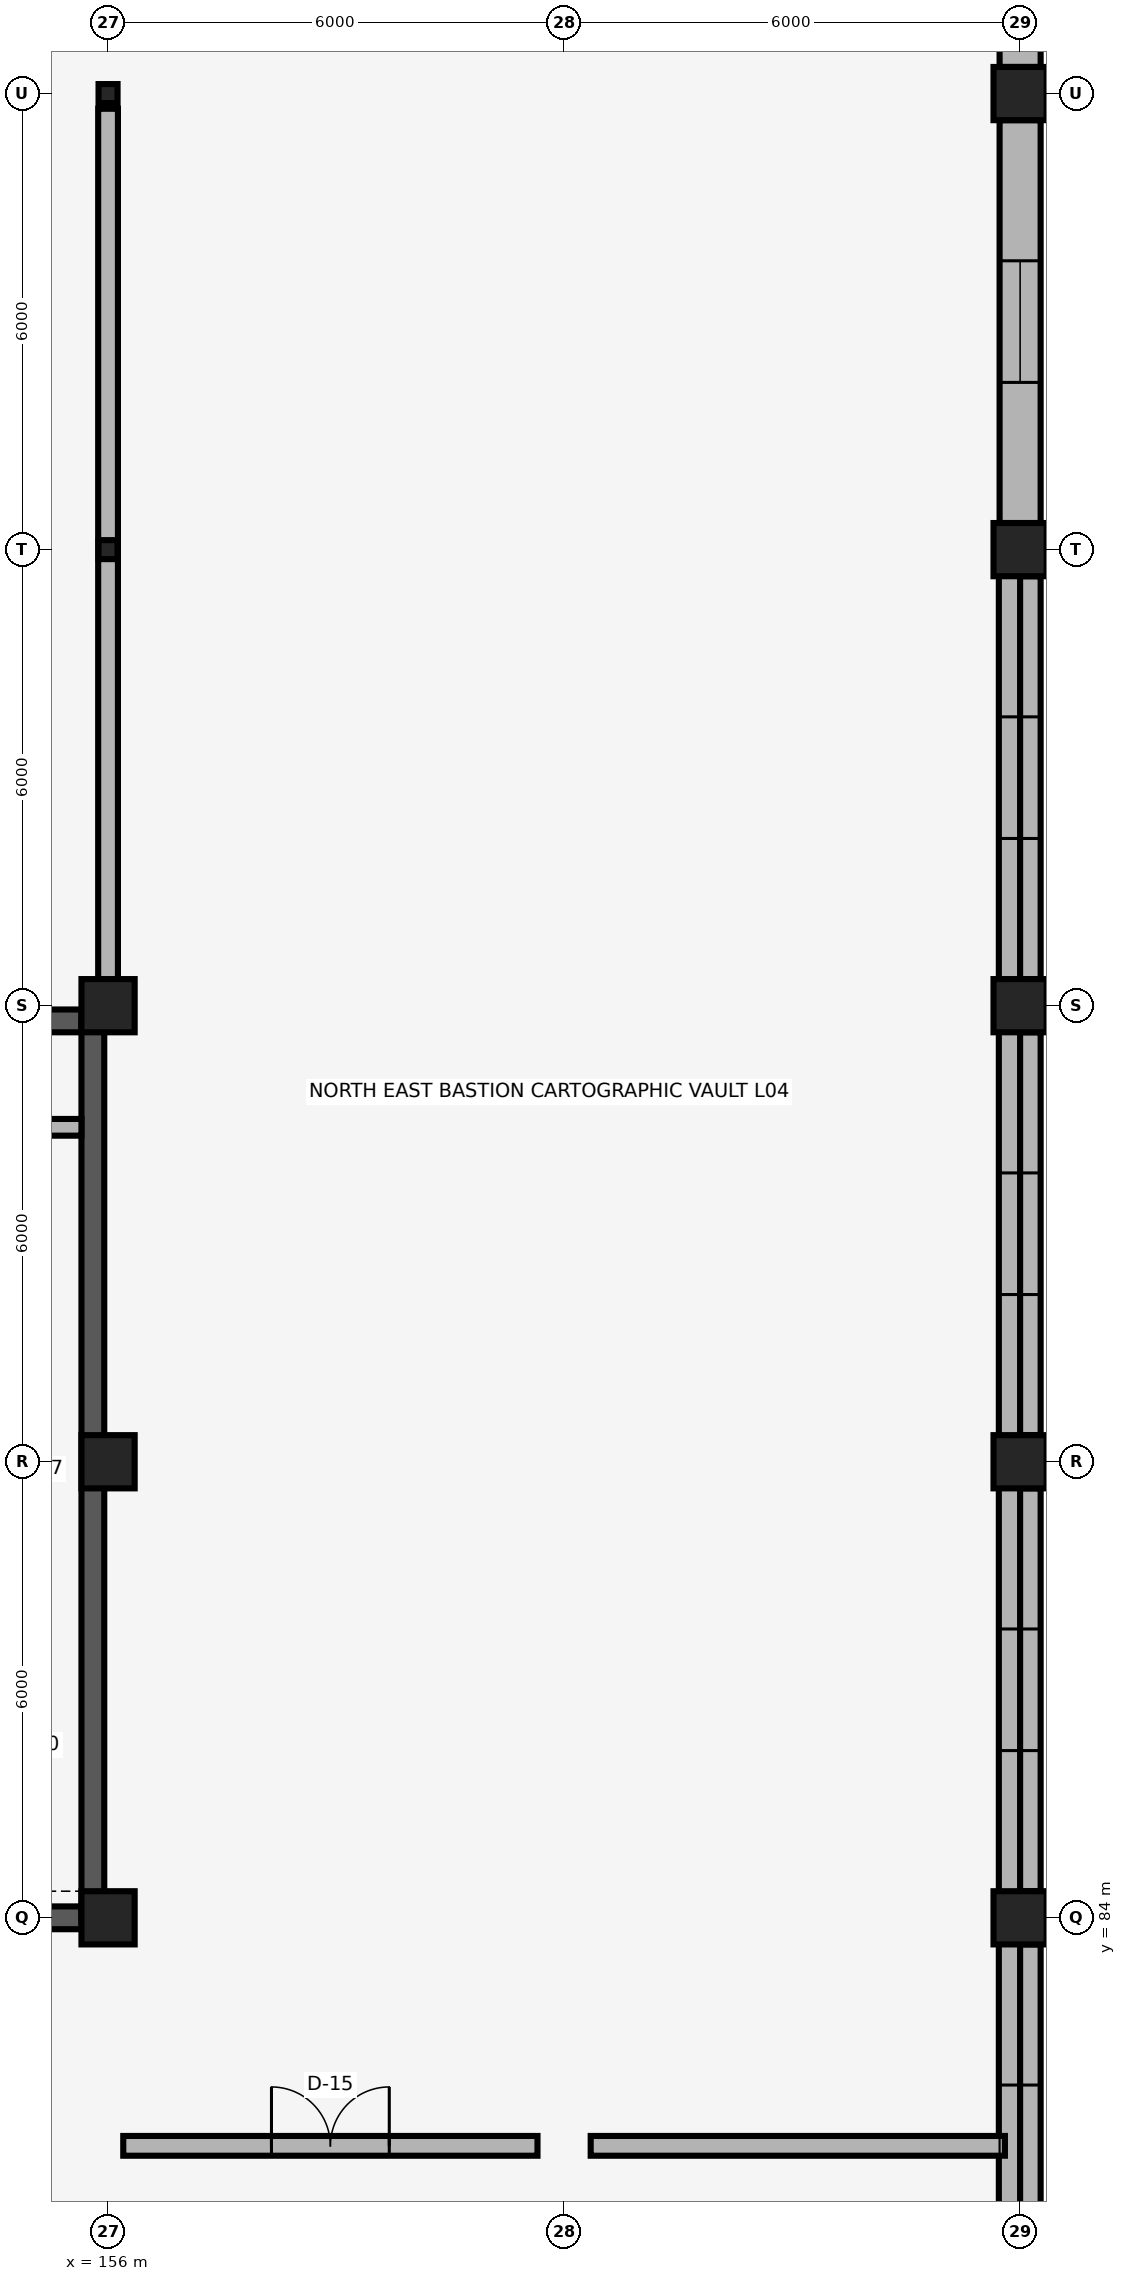
"""IFC4 building model, lengths in metres.
Left out: names, types, materials, properties, quantities, classifications, styles, units other than length and angle.
Written with IfcOpenShell. Run it as: python <this file> out.ifc"""

import sys

from ifc_helpers import new_model, si_unit, direction, frame, frame_2d, origin, origin_2d, place, context, subcontext, project, spatial, rectangle, i_section, extrude, element, fill, save


model = new_model("IFC4")
c1 = context("Model", 3, precision=1e-05, world=origin(), true_north=direction((0.0, 1.0)))
c2 = subcontext(c1, "Body", "Model", "MODEL_VIEW")
j1 = project(units=[si_unit("LENGTHUNIT", "METRE"), si_unit("PLANEANGLEUNIT", "RADIAN")], contexts=[c1])
p1 = place(None, origin())
s1 = spatial("IfcSite", under=j1, at=p1, CompositionType="ELEMENT")
p2 = place(p1, origin())
s2 = spatial("IfcBuilding", under=s1, at=p2, CompositionType="ELEMENT")
p3 = place(p2, frame((0.0, 0.0, 16.5)))
s3 = spatial("IfcBuildingStorey", under=s2, at=p3, CompositionType="ELEMENT", Elevation=16.5)
for number, where, z_axis, x_axis in (
    (1, (156.0, 84.0, 0.0), (0.0, 0.0, 1.0), (1.0, 0.0, 0.0)),
    (2, (168.0, 84.0, 0.0), (0.0, 0.0, 1.0), (1.0, 0.0, 0.0)),
    (3, (156.0, 90.0, 0.0), (0.0, 0.0, 1.0), (1.0, 0.0, 0.0)),
    (4, (168.0, 90.0, 0.0), (0.0, 0.0, 1.0), (1.0, 0.0, 0.0)),
    (5, (156.0, 96.0, 0.0), (0.0, 0.0, 1.0), (1.0, 0.0, 0.0)),
    (6, (168.0, 96.0, 0.0), (0.0, 0.0, 1.0), (1.0, 0.0, 0.0)),
):
    element("IfcColumn", number, at=place(p3, frame(where, z_axis=z_axis, x_axis=x_axis)), inside=s3, PredefinedType="COLUMN", context=c2, shape_type="SweptSolid", body=[
        extrude(rectangle(XDim=0.7, YDim=0.7, at=origin_2d()), origin(), (0.0, 0.0, 1.0), 4.0),
    ])
p4 = place(p3, frame((156.0, 102.0, 0.0), z_axis=(0.0, 0.0, 1.0), x_axis=(1.0, 0.0, 0.0)))
e7 = element("IfcColumn", 7, at=p4, inside=s3, PredefinedType="COLUMN", context=c2, shape_type="SweptSolid", body=[
    extrude(i_section(OverallWidth=0.25, OverallDepth=0.25, WebThickness=0.009, FlangeThickness=0.014, FilletRadius=0.016, at=origin_2d()), origin(), (0.0, 0.0, 1.0), 4.0),
])
p5 = place(p3, frame((168.0, 102.0, 0.0), z_axis=(0.0, 0.0, 1.0), x_axis=(1.0, 0.0, 0.0)))
e8 = element("IfcColumn", 8, at=p5, inside=s3, PredefinedType="COLUMN", context=c2, shape_type="SweptSolid", body=[
    extrude(rectangle(XDim=0.7, YDim=0.7, at=origin_2d()), origin(), (0.0, 0.0, 1.0), 4.0),
])
p6 = place(p3, frame((156.0, 108.0, 0.0), z_axis=(0.0, 0.0, 1.0), x_axis=(1.0, 0.0, 0.0)))
e9 = element("IfcColumn", 9, at=p6, inside=s3, PredefinedType="COLUMN", context=c2, shape_type="SweptSolid", body=[
    extrude(i_section(OverallWidth=0.25, OverallDepth=0.25, WebThickness=0.009, FlangeThickness=0.014, FilletRadius=0.016, at=origin_2d()), origin(), (0.0, 0.0, 1.0), 4.0),
])
p7 = place(p3, frame((168.0, 108.0, 0.0), z_axis=(0.0, 0.0, 1.0), x_axis=(1.0, 0.0, 0.0)))
e10 = element("IfcColumn", 10, at=p7, inside=s3, PredefinedType="COLUMN", context=c2, shape_type="SweptSolid", body=[
    extrude(rectangle(XDim=0.7, YDim=0.7, at=origin_2d()), origin(), (0.0, 0.0, 1.0), 4.0),
])
p8 = place(p3, frame((168.0, 78.35, 0.0), z_axis=(0.0, 0.0, 1.0), x_axis=(0.0, 1.0, 0.0)))
e11 = element("IfcWall", 11, at=p8, inside=s3, PredefinedType="SOLIDWALL", context=c2, shape_type="SweptSolid", body=[
    extrude(rectangle(XDim=5.3, YDim=0.54, at=frame_2d((2.65, 0.0))), origin(), (0.0, 0.0, 1.0), 3.55),
])
p9 = place(p8, frame((1.85, 0.0, 0.85)))
e12 = element("IfcOpeningElement", 12, at=p9, cuts=e11, PredefinedType="OPENING", context=c2, shape_type="SweptSolid", body=[
    extrude(rectangle(XDim=1.6, YDim=2.2, at=frame_2d((0.8, 1.1))), frame((0.0, 0.285, 0.0), z_axis=(0.0, -1.0, 0.0), x_axis=(1.0, 0.0, 0.0)), (0.0, 0.0, 1.0), 0.57),
])
p10 = place(p3, frame((168.0, 84.35, 0.0), z_axis=(0.0, 0.0, 1.0), x_axis=(0.0, 1.0, 0.0)))
e13 = element("IfcWall", 13, at=p10, inside=s3, PredefinedType="SOLIDWALL", context=c2, shape_type="SweptSolid", body=[
    extrude(rectangle(XDim=5.3, YDim=0.54, at=frame_2d((2.65, 0.0))), origin(), (0.0, 0.0, 1.0), 3.55),
])
p11 = place(p10, frame((1.85, 0.0, 0.85)))
e14 = element("IfcOpeningElement", 14, at=p11, cuts=e13, PredefinedType="OPENING", context=c2, shape_type="SweptSolid", body=[
    extrude(rectangle(XDim=1.6, YDim=2.2, at=frame_2d((0.8, 1.1))), frame((0.0, 0.285, 0.0), z_axis=(0.0, -1.0, 0.0), x_axis=(1.0, 0.0, 0.0)), (0.0, 0.0, 1.0), 0.57),
])
p12 = place(p3, frame((168.0, 90.35, 0.0), z_axis=(0.0, 0.0, 1.0), x_axis=(0.0, 1.0, 0.0)))
e15 = element("IfcWall", 15, at=p12, inside=s3, PredefinedType="SOLIDWALL", context=c2, shape_type="SweptSolid", body=[
    extrude(rectangle(XDim=5.3, YDim=0.54, at=frame_2d((2.65, 0.0))), origin(), (0.0, 0.0, 1.0), 3.55),
])
p13 = place(p12, frame((1.85, 0.0, 0.85)))
e16 = element("IfcOpeningElement", 16, at=p13, cuts=e15, PredefinedType="OPENING", context=c2, shape_type="SweptSolid", body=[
    extrude(rectangle(XDim=1.6, YDim=2.2, at=frame_2d((0.8, 1.1))), frame((0.0, 0.285, 0.0), z_axis=(0.0, -1.0, 0.0), x_axis=(1.0, 0.0, 0.0)), (0.0, 0.0, 1.0), 0.57),
])
p14 = place(p3, frame((168.0, 96.35, 0.0), z_axis=(0.0, 0.0, 1.0), x_axis=(0.0, 1.0, 0.0)))
e17 = element("IfcWall", 17, at=p14, inside=s3, PredefinedType="SOLIDWALL", context=c2, shape_type="SweptSolid", body=[
    extrude(rectangle(XDim=5.3, YDim=0.54, at=frame_2d((2.65, 0.0))), origin(), (0.0, 0.0, 1.0), 3.55),
])
p15 = place(p14, frame((1.85, 0.0, 0.85)))
e18 = element("IfcOpeningElement", 18, at=p15, cuts=e17, PredefinedType="OPENING", context=c2, shape_type="SweptSolid", body=[
    extrude(rectangle(XDim=1.6, YDim=2.2, at=frame_2d((0.8, 1.1))), frame((0.0, 0.285, 0.0), z_axis=(0.0, -1.0, 0.0), x_axis=(1.0, 0.0, 0.0)), (0.0, 0.0, 1.0), 0.57),
])
p16 = place(p3, frame((168.0, 102.35, 0.0), z_axis=(0.0, 0.0, 1.0), x_axis=(0.0, 1.0, 0.0)))
e19 = element("IfcWall", 19, at=p16, inside=s3, PredefinedType="SOLIDWALL", context=c2, shape_type="SweptSolid", body=[
    extrude(rectangle(XDim=5.3, YDim=0.54, at=frame_2d((2.65, 0.0))), origin(), (0.0, 0.0, 1.0), 3.55),
])
p17 = place(p16, frame((1.85, 0.0, 0.85)))
e20 = element("IfcOpeningElement", 20, at=p17, cuts=e19, PredefinedType="OPENING", context=c2, shape_type="SweptSolid", body=[
    extrude(rectangle(XDim=1.6, YDim=2.2, at=frame_2d((0.8, 1.1))), frame((0.0, 0.285, 0.0), z_axis=(0.0, -1.0, 0.0), x_axis=(1.0, 0.0, 0.0)), (0.0, 0.0, 1.0), 0.57),
])
p18 = place(p3, frame((168.0, 108.35, 0.0), z_axis=(0.0, 0.0, 1.0), x_axis=(0.0, 1.0, 0.0)))
e21 = element("IfcWall", 21, at=p18, inside=s3, PredefinedType="SOLIDWALL", context=c2, shape_type="SweptSolid", body=[
    extrude(rectangle(XDim=5.3, YDim=0.54, at=frame_2d((2.65, 0.0))), origin(), (0.0, 0.0, 1.0), 3.55),
])
p19 = place(p18, frame((1.925, 0.0, 0.85)))
e22 = element("IfcOpeningElement", 22, at=p19, cuts=e21, PredefinedType="OPENING", context=c2, shape_type="SweptSolid", body=[
    extrude(rectangle(XDim=1.45, YDim=2.15, at=frame_2d((0.725, 1.075))), frame((0.0, 0.285, 0.0), z_axis=(0.0, -1.0, 0.0), x_axis=(1.0, 0.0, 0.0)), (0.0, 0.0, 1.0), 0.57),
])
p20 = place(p3, frame((167.86, 12.0, 4.2), z_axis=(0.0, 0.0, 1.0), x_axis=(0.0, 1.0, 0.0)))
e23 = element("IfcWall", 23, at=p20, inside=s3, PredefinedType="PARAPET", context=c2, shape_type="SweptSolid", body=[
    extrude(rectangle(XDim=90.0, YDim=0.28, at=frame_2d((45.0, 0.0))), origin(), (0.0, 0.0, 1.0), 0.85),
])
p21 = place(p3, frame((150.35, 84.0, 0.0), z_axis=(0.0, 0.0, 1.0), x_axis=(1.0, 0.0, 0.0)))
e24 = element("IfcWall", 24, at=p21, inside=s3, PredefinedType="SHEAR", context=c2, shape_type="SweptSolid", body=[
    extrude(rectangle(XDim=5.3, YDim=0.3, at=frame_2d((2.65, 0.0))), origin(), (0.0, 0.0, 1.0), 4.0),
])
p22 = place(p21, frame((1.925, 0.0, 0.0)))
e25 = element("IfcOpeningElement", 25, at=p22, cuts=e24, PredefinedType="OPENING", context=c2, shape_type="SweptSolid", body=[
    extrude(rectangle(XDim=1.45, YDim=2.25, at=frame_2d((0.725, 1.125))), frame((0.0, 0.165, 0.0), z_axis=(0.0, -1.0, 0.0), x_axis=(1.0, 0.0, 0.0)), (0.0, 0.0, 1.0), 0.33),
])
p23 = place(p3, frame((150.35, 95.8, 0.0), z_axis=(0.0, 0.0, 1.0), x_axis=(1.0, 0.0, 0.0)))
e26 = element("IfcWall", 26, at=p23, inside=s3, PredefinedType="SHEAR", context=c2, shape_type="SweptSolid", body=[
    extrude(rectangle(XDim=5.3, YDim=0.3, at=frame_2d((2.65, 0.0))), origin(), (0.0, 0.0, 1.0), 4.0),
])
p24 = place(p3, frame((155.8, 84.0, 0.0), z_axis=(0.0, 0.0, 1.0), x_axis=(0.0, 1.0, 0.0)))
e27 = element("IfcWall", 27, at=p24, inside=s3, PredefinedType="SHEAR", context=c2, shape_type="SweptSolid", body=[
    extrude(rectangle(XDim=11.8, YDim=0.3, at=frame_2d((5.9, 0.0))), origin(), (0.0, 0.0, 1.0), 4.0),
])
p25 = place(p3, frame((154.55, 94.4, 0.0), z_axis=(0.0, 0.0, 1.0), x_axis=(1.0, 0.0, 0.0)))
e28 = element("IfcWall", 28, at=p25, inside=s3, PredefinedType="PARTITIONING", context=c2, shape_type="SweptSolid", body=[
    extrude(rectangle(XDim=1.1, YDim=0.22, at=frame_2d((0.55, 0.0))), origin(), (0.0, 0.0, 1.0), 4.0),
])
p26 = place(p3, frame((156.2, 81.0, 0.0), z_axis=(0.0, 0.0, 1.0), x_axis=(1.0, 0.0, 0.0)))
e29 = element("IfcWall", 29, at=p26, inside=s3, PredefinedType="PARTITIONING", context=c2, shape_type="SweptSolid", body=[
    extrude(rectangle(XDim=5.45, YDim=0.26, at=frame_2d((2.725, 0.0))), origin(), (0.0, 0.0, 1.0), 4.0),
])
p27 = place(p26, frame((1.95, 0.0, 0.0)))
e30 = element("IfcOpeningElement", 30, at=p27, cuts=e29, PredefinedType="OPENING", context=c2, shape_type="SweptSolid", body=[
    extrude(rectangle(XDim=1.55, YDim=2.3, at=frame_2d((0.775, 1.15))), frame((0.0, 0.145, 0.0), z_axis=(0.0, -1.0, 0.0), x_axis=(1.0, 0.0, 0.0)), (0.0, 0.0, 1.0), 0.29),
])
p28 = place(p3, frame((162.35, 81.0, 0.0), z_axis=(0.0, 0.0, 1.0), x_axis=(1.0, 0.0, 0.0)))
e31 = element("IfcWall", 31, at=p28, inside=s3, PredefinedType="PARTITIONING", context=c2, shape_type="SweptSolid", body=[
    extrude(rectangle(XDim=5.45, YDim=0.26, at=frame_2d((2.725, 0.0))), origin(), (0.0, 0.0, 1.0), 4.0),
])
p29 = place(p3, frame((156.0, 96.2, 0.0), z_axis=(0.0, 0.0, 1.0), x_axis=(0.0, 1.0, 0.0)))
e32 = element("IfcWall", 32, at=p29, inside=s3, PredefinedType="PARTITIONING", context=c2, shape_type="SweptSolid", body=[
    extrude(rectangle(XDim=11.6, YDim=0.26, at=frame_2d((5.8, 0.0))), origin(), (0.0, 0.0, 1.0), 3.56),
])
p30 = place(p9, origin())
e33 = element("IfcWindow", 33, at=p30, inside=s3, PartitioningType="SINGLE_PANEL", PredefinedType="WINDOW", context=c2, shape_type="SweptSolid", body=[
    extrude(rectangle(XDim=1.6, YDim=2.2, at=frame_2d((0.8, 1.1))), frame((0.0, 0.03, 0.0), z_axis=(0.0, -1.0, 0.0), x_axis=(1.0, 0.0, 0.0)), (0.0, 0.0, 1.0), 0.06),
])
fill(e12, e33)
p31 = place(p11, origin())
e34 = element("IfcWindow", 34, at=p31, inside=s3, PartitioningType="SINGLE_PANEL", PredefinedType="WINDOW", context=c2, shape_type="SweptSolid", body=[
    extrude(rectangle(XDim=1.6, YDim=2.2, at=frame_2d((0.8, 1.1))), frame((0.0, 0.03, 0.0), z_axis=(0.0, -1.0, 0.0), x_axis=(1.0, 0.0, 0.0)), (0.0, 0.0, 1.0), 0.06),
])
fill(e14, e34)
p32 = place(p13, origin())
e35 = element("IfcWindow", 35, at=p32, inside=s3, PartitioningType="SINGLE_PANEL", PredefinedType="WINDOW", context=c2, shape_type="SweptSolid", body=[
    extrude(rectangle(XDim=1.6, YDim=2.2, at=frame_2d((0.8, 1.1))), frame((0.0, 0.03, 0.0), z_axis=(0.0, -1.0, 0.0), x_axis=(1.0, 0.0, 0.0)), (0.0, 0.0, 1.0), 0.06),
])
fill(e16, e35)
p33 = place(p15, origin())
e36 = element("IfcWindow", 36, at=p33, inside=s3, PartitioningType="SINGLE_PANEL", PredefinedType="WINDOW", context=c2, shape_type="SweptSolid", body=[
    extrude(rectangle(XDim=1.6, YDim=2.2, at=frame_2d((0.8, 1.1))), frame((0.0, 0.03, 0.0), z_axis=(0.0, -1.0, 0.0), x_axis=(1.0, 0.0, 0.0)), (0.0, 0.0, 1.0), 0.06),
])
fill(e18, e36)
p34 = place(p17, origin())
e37 = element("IfcWindow", 37, at=p34, inside=s3, PartitioningType="SINGLE_PANEL", PredefinedType="WINDOW", context=c2, shape_type="SweptSolid", body=[
    extrude(rectangle(XDim=1.6, YDim=2.2, at=frame_2d((0.8, 1.1))), frame((0.0, 0.03, 0.0), z_axis=(0.0, -1.0, 0.0), x_axis=(1.0, 0.0, 0.0)), (0.0, 0.0, 1.0), 0.06),
])
fill(e20, e37)
p35 = place(p27, origin())
e38 = element("IfcDoor", 38, at=p35, inside=s3, OperationType="DOUBLE_DOOR_SINGLE_SWING", PredefinedType="DOOR", context=c2, shape_type="SweptSolid", body=[
    extrude(rectangle(XDim=1.55, YDim=2.3, at=frame_2d((0.775, 1.15))), frame((0.0, 0.025, 0.0), z_axis=(0.0, -1.0, 0.0), x_axis=(1.0, 0.0, 0.0)), (0.0, 0.0, 1.0), 0.05),
])
fill(e30, e38)
save(model, sys.argv[1])
